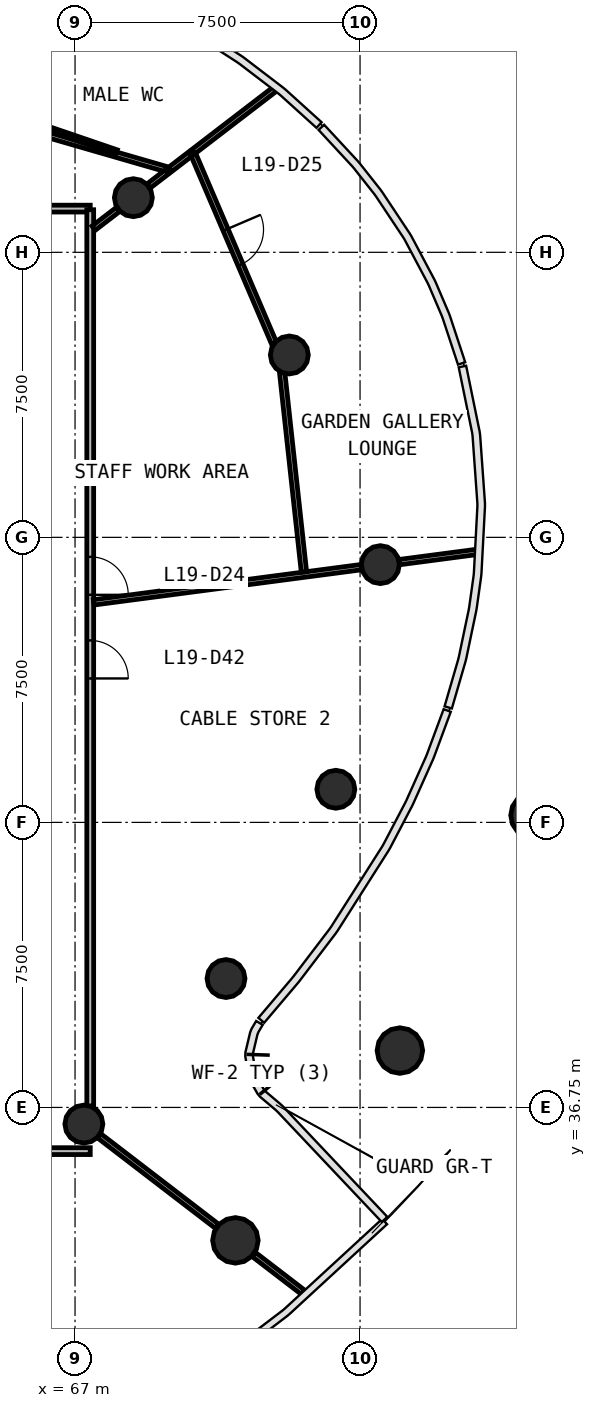
"""IFC4 building model, lengths in metres.
Left out: names, types, materials, properties, quantities, classifications, styles, units other than length and angle.
Written with IfcOpenShell. Run it as: python <this file> out.ifc"""

import sys

from ifc_helpers import new_model, si_unit, direction, frame, frame_2d, origin, origin_2d, place, context, subcontext, project, spatial, rectangle, circle, extrude, source, transform, mapped, element, fill, save


model = new_model("IFC4")
c1 = context("Model", 3, precision=1e-05, world=origin(), true_north=direction((0.0, 1.0)))
c2 = subcontext(c1, "Body", "Model", "MODEL_VIEW")
j1 = project(units=[si_unit("LENGTHUNIT", "METRE"), si_unit("PLANEANGLEUNIT", "RADIAN")], contexts=[c1])
p1 = place(None, origin())
s1 = spatial("IfcSite", under=j1, at=p1, CompositionType="ELEMENT")
p2 = place(p1, origin())
s2 = spatial("IfcBuilding", under=s1, at=p2, CompositionType="ELEMENT")
p3 = place(p2, frame((0.0, 0.0, 83.9)))
s3 = spatial("IfcBuildingStorey", under=s2, at=p3, CompositionType="ELEMENT", Elevation=83.9)
m1 = source(origin(), c2, "Body", "SweptSolid", [
    extrude(circle(Radius=0.6, at=origin_2d()), origin(), (0.0, 0.0, 1.0), 4.1),
])
for number, where, z_axis, x_axis in (
    (1, (71.22, 33.252, 0.0), (0.0, 0.0, 1.0), (1.0, 0.0, 0.0)),
    (2, (75.548, 38.246, 0.0), (0.0, 0.0, 1.0), (1.0, 0.0, 0.0)),
    (3, (79.064, 44.437, 0.0), (0.0, 0.0, 1.0), (1.0, 0.0, 0.0)),
):
    element("IfcColumn", number, at=place(p3, frame(where, z_axis=z_axis, x_axis=x_axis)), inside=s3, PredefinedType="COLUMN", context=c2, shape_type="MappedRepresentation", body=[
        mapped(m1, transform((0.0, 0.0, 0.0), scale=1.0)),
    ])
m2 = source(origin(), c2, "Body", "SweptSolid", [
    extrude(circle(Radius=0.5, at=origin_2d()), origin(), (0.0, 0.0, 1.0), 4.1),
])
for number, where, z_axis, x_axis in (
    (4, (75.034, 51.032, 0.0), (0.0, 0.0, 1.0), (1.0, 0.0, 0.0)),
    (5, (72.639, 56.549, 0.0), (0.0, 0.0, 1.0), (1.0, 0.0, 0.0)),
    (6, (68.535, 60.688, 0.0), (0.0, 0.0, 1.0), (1.0, 0.0, 0.0)),
    (7, (67.232, 36.312, 0.0), (0.0, 0.0, 1.0), (1.0, 0.0, 0.0)),
    (8, (70.972, 40.141, 0.0), (0.0, 0.0, 1.0), (1.0, 0.0, 0.0)),
    (9, (73.863, 45.122, 0.0), (0.0, 0.0, 1.0), (1.0, 0.0, 0.0)),
):
    element("IfcColumn", number, at=place(p3, frame(where, z_axis=z_axis, x_axis=x_axis)), inside=s3, PredefinedType="COLUMN", context=c2, shape_type="MappedRepresentation", body=[
        mapped(m2, transform((0.0, 0.0, 0.0), scale=1.0)),
    ])
p4 = place(p3, frame((67.4, 35.6, 0.0), z_axis=(0.0, 0.0, 1.0), x_axis=(-1.0, 0.0, 0.0)))
e10 = element("IfcWall", 10, at=p4, inside=s3, PredefinedType="PARTITIONING", context=c2, shape_type="SweptSolid", body=[
    extrude(rectangle(XDim=30.8, YDim=0.18, at=frame_2d((15.4, 0.0))), origin(), (0.0, 0.0, 1.0), 2.9),
])
p5 = place(p4, frame((20.95, 0.0, 0.0)))
e11 = element("IfcOpeningElement", 11, at=p5, cuts=e10, PredefinedType="OPENING", context=c2, shape_type="SweptSolid", body=[
    extrude(rectangle(XDim=1.0, YDim=2.1, at=frame_2d((0.5, 1.05))), frame((0.0, 0.1, 0.0), z_axis=(0.0, -1.0, 0.0), x_axis=(1.0, 0.0, 0.0)), (0.0, 0.0, 1.0), 0.2),
])
p6 = place(p4, frame((17.35, 0.0, 0.0)))
e12 = element("IfcOpeningElement", 12, at=p6, cuts=e10, PredefinedType="OPENING", context=c2, shape_type="SweptSolid", body=[
    extrude(rectangle(XDim=1.0, YDim=2.1, at=frame_2d((0.5, 1.05))), frame((0.0, 0.1, 0.0), z_axis=(0.0, -1.0, 0.0), x_axis=(1.0, 0.0, 0.0)), (0.0, 0.0, 1.0), 0.2),
])
p7 = place(p4, frame((14.95, 0.0, 0.0)))
e13 = element("IfcOpeningElement", 13, at=p7, cuts=e10, PredefinedType="OPENING", context=c2, shape_type="SweptSolid", body=[
    extrude(rectangle(XDim=1.0, YDim=2.1, at=frame_2d((0.5, 1.05))), frame((0.0, 0.1, 0.0), z_axis=(0.0, -1.0, 0.0), x_axis=(1.0, 0.0, 0.0)), (0.0, 0.0, 1.0), 0.2),
])
p8 = place(p3, frame((36.6, 60.4, 0.0), z_axis=(0.0, 0.0, 1.0), x_axis=(1.0, 0.0, 0.0)))
e14 = element("IfcWall", 14, at=p8, inside=s3, PredefinedType="PARTITIONING", context=c2, shape_type="SweptSolid", body=[
    extrude(rectangle(XDim=30.8, YDim=0.18, at=frame_2d((15.4, 0.0))), origin(), (0.0, 0.0, 1.0), 2.9),
])
p9 = place(p8, frame((27.45, 0.0, 0.0)))
e15 = element("IfcOpeningElement", 15, at=p9, cuts=e14, PredefinedType="OPENING", context=c2, shape_type="SweptSolid", body=[
    extrude(rectangle(XDim=0.9, YDim=2.1, at=frame_2d((0.45, 1.05))), frame((0.0, 0.1, 0.0), z_axis=(0.0, -1.0, 0.0), x_axis=(1.0, 0.0, 0.0)), (0.0, 0.0, 1.0), 0.2),
])
p10 = place(p8, frame((23.85, 0.0, 0.0)))
e16 = element("IfcOpeningElement", 16, at=p10, cuts=e14, PredefinedType="OPENING", context=c2, shape_type="SweptSolid", body=[
    extrude(rectangle(XDim=0.9, YDim=2.1, at=frame_2d((0.45, 1.05))), frame((0.0, 0.1, 0.0), z_axis=(0.0, -1.0, 0.0), x_axis=(1.0, 0.0, 0.0)), (0.0, 0.0, 1.0), 0.2),
])
p11 = place(p8, frame((20.85, 0.0, 0.0)))
e17 = element("IfcOpeningElement", 17, at=p11, cuts=e14, PredefinedType="OPENING", context=c2, shape_type="SweptSolid", body=[
    extrude(rectangle(XDim=0.9, YDim=2.1, at=frame_2d((0.45, 1.05))), frame((0.0, 0.1, 0.0), z_axis=(0.0, -1.0, 0.0), x_axis=(1.0, 0.0, 0.0)), (0.0, 0.0, 1.0), 0.2),
])
p12 = place(p8, frame((14.95, 0.0, 0.0)))
e18 = element("IfcOpeningElement", 18, at=p12, cuts=e14, PredefinedType="OPENING", context=c2, shape_type="SweptSolid", body=[
    extrude(rectangle(XDim=1.0, YDim=2.1, at=frame_2d((0.5, 1.05))), frame((0.0, 0.1, 0.0), z_axis=(0.0, -1.0, 0.0), x_axis=(1.0, 0.0, 0.0)), (0.0, 0.0, 1.0), 0.2),
])
p13 = place(p8, frame((12.55, 0.0, 0.0)))
e19 = element("IfcOpeningElement", 19, at=p13, cuts=e14, PredefinedType="OPENING", context=c2, shape_type="SweptSolid", body=[
    extrude(rectangle(XDim=1.0, YDim=2.1, at=frame_2d((0.5, 1.05))), frame((0.0, 0.1, 0.0), z_axis=(0.0, -1.0, 0.0), x_axis=(1.0, 0.0, 0.0)), (0.0, 0.0, 1.0), 0.2),
])
p14 = place(p8, frame((8.95, 0.0, 0.0)))
e20 = element("IfcOpeningElement", 20, at=p14, cuts=e14, PredefinedType="OPENING", context=c2, shape_type="SweptSolid", body=[
    extrude(rectangle(XDim=1.0, YDim=2.1, at=frame_2d((0.5, 1.05))), frame((0.0, 0.1, 0.0), z_axis=(0.0, -1.0, 0.0), x_axis=(1.0, 0.0, 0.0)), (0.0, 0.0, 1.0), 0.2),
])
p15 = place(p3, frame((67.4, 60.37, 0.0), z_axis=(0.0, 0.0, 1.0), x_axis=(0.0, -1.0, 0.0)))
e21 = element("IfcWall", 21, at=p15, inside=s3, PredefinedType="PARTITIONING", context=c2, shape_type="SweptSolid", body=[
    extrude(rectangle(XDim=23.583, YDim=0.18, at=frame_2d((11.791, 0.0))), origin(), (0.0, 0.0, 1.0), 2.9),
])
p16 = place(p15, frame((9.133, 0.0, 0.0)))
e22 = element("IfcOpeningElement", 22, at=p16, cuts=e21, PredefinedType="OPENING", context=c2, shape_type="SweptSolid", body=[
    extrude(rectangle(XDim=1.0, YDim=2.1, at=frame_2d((0.5, 1.05))), frame((0.0, 0.1, 0.0), z_axis=(0.0, -1.0, 0.0), x_axis=(1.0, 0.0, 0.0)), (0.0, 0.0, 1.0), 0.2),
])
p17 = place(p15, frame((11.333, 0.0, 0.0)))
e23 = element("IfcOpeningElement", 23, at=p17, cuts=e21, PredefinedType="OPENING", context=c2, shape_type="SweptSolid", body=[
    extrude(rectangle(XDim=1.0, YDim=2.1, at=frame_2d((0.5, 1.05))), frame((0.0, 0.1, 0.0), z_axis=(0.0, -1.0, 0.0), x_axis=(1.0, 0.0, 0.0)), (0.0, 0.0, 1.0), 0.2),
])
p18 = place(p3, frame((67.49, 50.039, 0.0), z_axis=(0.0, 0.0, 1.0), x_axis=(0.99144622305, 0.130515848849, 0.0)))
e24 = element("IfcWall", 24, at=p18, inside=s3, PredefinedType="PARTITIONING", context=c2, shape_type="SweptSolid", body=[
    extrude(rectangle(XDim=7.104, YDim=0.14, at=frame_2d((3.552, 0.0))), origin(), (0.0, 0.0, 1.0), 2.9),
])
p19 = place(p3, frame((69.483, 61.415, 0.0), z_axis=(0.0, 0.0, 1.0), x_axis=(-0.960703393741, 0.277576996982, 0.0)))
e25 = element("IfcWall", 25, at=p19, inside=s3, PredefinedType="PARTITIONING", context=c2, shape_type="SweptSolid", body=[
    extrude(rectangle(XDim=5.632, YDim=0.14, at=frame_2d((2.816, 0.0))), origin(), (0.0, 0.0, 1.0), 2.9),
])
p20 = place(p3, frame((70.089, 61.88, 0.0), z_axis=(0.0, 0.0, 1.0), x_axis=(0.393299181535, -0.919410546929, 0.0)))
e26 = element("IfcWall", 26, at=p20, inside=s3, PredefinedType="PARTITIONING", context=c2, shape_type="SweptSolid", body=[
    extrude(rectangle(XDim=5.465, YDim=0.14, at=frame_2d((2.732, 0.0))), origin(), (0.0, 0.0, 1.0), 2.9),
])
p21 = place(p20, frame((2.215, 0.0, 0.0)))
e27 = element("IfcOpeningElement", 27, at=p21, cuts=e26, PredefinedType="OPENING", context=c2, shape_type="SweptSolid", body=[
    extrude(rectangle(XDim=1.0, YDim=2.1, at=frame_2d((0.5, 1.05))), frame((0.0, 0.08, 0.0), z_axis=(0.0, -1.0, 0.0), x_axis=(1.0, 0.0, 0.0)), (0.0, 0.0, 1.0), 0.16),
])
p22 = place(p3, frame((73.024, 50.838, 0.0), z_axis=(0.0, 0.0, 1.0), x_axis=(-0.108607218468, 0.994084740903, 0.0)))
e28 = element("IfcWall", 28, at=p22, inside=s3, PredefinedType="PARTITIONING", context=c2, shape_type="SweptSolid", body=[
    extrude(rectangle(XDim=5.274, YDim=0.14, at=frame_2d((2.637, 0.0))), origin(), (0.0, 0.0, 1.0), 2.9),
])
p23 = place(p3, frame((67.633, 36.005, 0.0), z_axis=(0.0, 0.0, 1.0), x_axis=(0.793362528146, -0.608749454977, 0.0)))
e29 = element("IfcWall", 29, at=p23, inside=s3, PredefinedType="PARTITIONING", context=c2, shape_type="SweptSolid", body=[
    extrude(rectangle(XDim=3.917, YDim=0.14, at=frame_2d((1.958, 0.0))), origin(), (0.0, 0.0, 1.0), 2.9),
])
p24 = place(p3, frame((70.113, 61.898, 0.0), z_axis=(0.0, 0.0, 1.0), x_axis=(0.793370018498, 0.608739692931, 0.0)))
e30 = element("IfcWall", 30, at=p24, inside=s3, PredefinedType="PARTITIONING", context=c2, shape_type="SweptSolid", body=[
    extrude(rectangle(XDim=2.711, YDim=0.14, at=frame_2d((1.355, 0.0))), origin(), (0.0, 0.0, 1.0), 2.9),
])
p25 = place(p3, frame((75.534, 51.098, 0.0), z_axis=(0.0, 0.0, 1.0), x_axis=(0.991447064532, 0.130509456483, 0.0)))
e31 = element("IfcWall", 31, at=p25, inside=s3, PredefinedType="PARTITIONING", context=c2, shape_type="SweptSolid", body=[
    extrude(rectangle(XDim=2.069, YDim=0.14, at=frame_2d((1.034, 0.0))), origin(), (0.0, 0.0, 1.0), 2.9),
])
p26 = place(p3, frame((71.699, 32.884, 0.0), z_axis=(0.0, 0.0, 1.0), x_axis=(0.793364464168, -0.608746931816, 0.0)))
e32 = element("IfcWall", 32, at=p26, inside=s3, PredefinedType="PARTITIONING", context=c2, shape_type="SweptSolid", body=[
    extrude(rectangle(XDim=1.641, YDim=0.14, at=frame_2d((0.821, 0.0))), origin(), (0.0, 0.0, 1.0), 2.9),
])
p27 = place(p3, frame((67.49, 59.886, 0.0), z_axis=(0.0, 0.0, 1.0), x_axis=(0.793316076519, 0.608809989025, 0.0)))
e33 = element("IfcWall", 33, at=p27, inside=s3, PredefinedType="PARTITIONING", context=c2, shape_type="SweptSolid", body=[
    extrude(rectangle(XDim=0.812, YDim=0.14, at=frame_2d((0.406, 0.0))), origin(), (0.0, 0.0, 1.0), 2.9),
])
p28 = place(p3, frame((69.506, 61.433, 0.0), z_axis=(0.0, 0.0, 1.0), x_axis=(0.793404561432, 0.608694670504, 0.0)))
e34 = element("IfcWall", 34, at=p28, inside=s3, PredefinedType="PARTITIONING", context=c2, shape_type="SweptSolid", body=[
    extrude(rectangle(XDim=0.662, YDim=0.14, at=frame_2d((0.331, 0.0))), origin(), (0.0, 0.0, 1.0), 2.9),
])
p29 = place(p3, frame((68.935, 60.995, 0.0), z_axis=(0.0, 0.0, 1.0), x_axis=(0.79334569595, 0.608771391178, 0.0)))
e35 = element("IfcWall", 35, at=p29, inside=s3, PredefinedType="PARTITIONING", context=c2, shape_type="SweptSolid", body=[
    extrude(rectangle(XDim=0.603, YDim=0.14, at=frame_2d((0.302, 0.0))), origin(), (0.0, 0.0, 1.0), 2.9),
])
p30 = place(p3, frame((68.094, 61.889, 0.0), z_axis=(0.0, 0.0, 1.0), x_axis=(-0.946388818608, 0.323029726207, 0.0)))
e36 = element("IfcWall", 36, at=p30, inside=s3, PredefinedType="PARTITIONING", context=c2, shape_type="SweptSolid", body=[
    extrude(rectangle(XDim=2.71, YDim=0.12, at=frame_2d((1.355, 0.0))), origin(), (0.0, 0.0, 1.0), 2.9),
])
m3 = source(origin(), c2, "Body", "SweptSolid", [
    extrude(rectangle(XDim=1.0, YDim=2.1, at=frame_2d((0.5, 1.05))), frame((0.0, 0.025, 0.0), z_axis=(0.0, -1.0, 0.0), x_axis=(1.0, 0.0, 0.0)), (0.0, 0.0, 1.0), 0.05),
])
p31 = place(p16, origin())
e37 = element("IfcDoor", 37, at=p31, inside=s3, OperationType="SINGLE_SWING_RIGHT", PredefinedType="DOOR", context=c2, shape_type="MappedRepresentation", body=[
    mapped(m3, transform((0.0, 0.0, 0.0), scale=1.0)),
])
fill(e22, e37)
p32 = place(p21, origin())
e38 = element("IfcDoor", 38, at=p32, inside=s3, OperationType="SINGLE_SWING_LEFT", PredefinedType="DOOR", context=c2, shape_type="MappedRepresentation", body=[
    mapped(m3, transform((0.0, 0.0, 0.0), scale=1.0)),
])
fill(e27, e38)
p33 = place(p17, origin())
e39 = element("IfcDoor", 39, at=p33, inside=s3, OperationType="SINGLE_SWING_RIGHT", PredefinedType="DOOR", context=c2, shape_type="MappedRepresentation", body=[
    mapped(m3, transform((0.0, 0.0, 0.0), scale=1.0)),
])
fill(e23, e39)
save(model, sys.argv[1])
